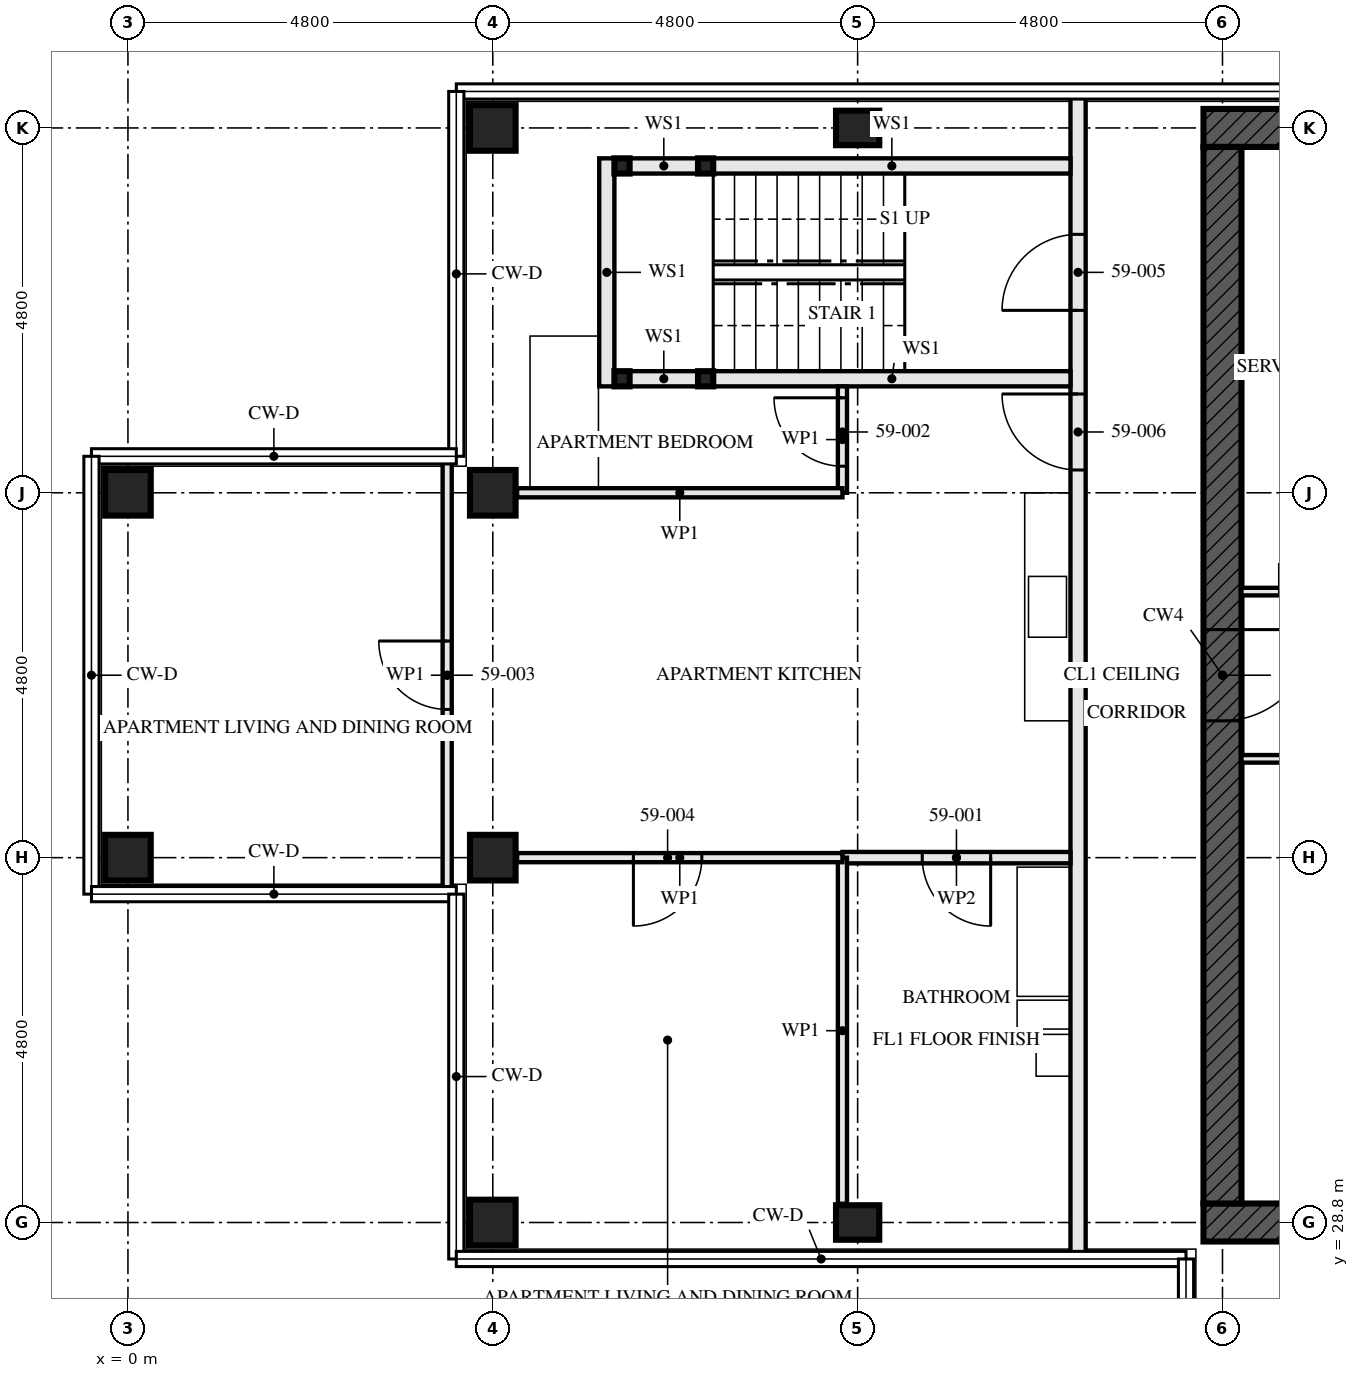
"""IFC4 building model, lengths in metres.
Left out: names, types, materials, properties, quantities, classifications, styles, units other than length and angle.
Written with IfcOpenShell. Run it as: python <this file> out.ifc"""

import sys

from ifc_helpers import new_model, si_unit, direction, frame, frame_2d, origin, origin_2d, place, context, subcontext, project, spatial, rectangle, hollow_rectangle, i_section, extrude, element, fill, save


model = new_model("IFC4")
c1 = context("Model", 3, precision=1e-05, world=origin(), true_north=direction((0.0, 1.0)))
c2 = subcontext(c1, "Body", "Model", "MODEL_VIEW")
j1 = project(units=[si_unit("LENGTHUNIT", "METRE"), si_unit("PLANEANGLEUNIT", "RADIAN")], contexts=[c1])
p1 = place(None, origin())
s1 = spatial("IfcSite", under=j1, at=p1, CompositionType="ELEMENT")
p2 = place(p1, origin())
s2 = spatial("IfcBuilding", under=s1, at=p2, CompositionType="ELEMENT")
p3 = place(p2, frame((0.0, 0.0, 215.5)))
s3 = spatial("IfcBuildingStorey", under=s2, at=p3, CompositionType="ELEMENT", Elevation=215.5)
for number, where, z_axis, x_axis in (
    (1, (0.0, 33.6, 0.0), (0.0, 0.0, 1.0), (0.0, 1.0, 0.0)),
    (2, (0.0, 38.4, 0.0), (0.0, 0.0, 1.0), (0.0, 1.0, 0.0)),
    (3, (4.8, 28.8, 0.0), (0.0, 0.0, 1.0), (0.0, 1.0, 0.0)),
    (4, (4.8, 33.6, 0.0), (0.0, 0.0, 1.0), (0.0, 1.0, 0.0)),
    (5, (4.8, 38.4, 0.0), (0.0, 0.0, 1.0), (0.0, 1.0, 0.0)),
    (6, (4.8, 43.2, 0.0), (0.0, 0.0, 1.0), (0.0, 1.0, 0.0)),
):
    element("IfcColumn", number, at=place(p3, frame(where, z_axis=z_axis, x_axis=x_axis)), inside=s3, PredefinedType="COLUMN", context=c2, shape_type="SweptSolid", body=[
        extrude(hollow_rectangle(XDim=0.6, YDim=0.6, WallThickness=0.05, at=origin_2d()), origin(), (0.0, 0.0, 1.0), 3.5),
    ])
for number, where, z_axis, x_axis in (
    (7, (9.6, 28.8, 0.0), (0.0, 0.0, 1.0), (0.0, 1.0, 0.0)),
    (8, (9.6, 43.2, 0.0), (0.0, 0.0, 1.0), (0.0, 1.0, 0.0)),
):
    element("IfcColumn", number, at=place(p3, frame(where, z_axis=z_axis, x_axis=x_axis)), inside=s3, PredefinedType="COLUMN", context=c2, shape_type="SweptSolid", body=[
        extrude(i_section(OverallWidth=0.454, OverallDepth=0.569, WebThickness=0.078, FlangeThickness=0.125, FilletRadius=0.015, at=origin_2d()), origin(), (0.0, 0.0, 1.0), 3.5),
    ])
p4 = place(p3, frame((14.15, 28.8, -0.17), z_axis=(0.0, 0.0, 1.0), x_axis=(1.0, 0.0, 0.0)))
e9 = element("IfcWall", 9, at=p4, inside=s3, PredefinedType="SHEAR", context=c2, shape_type="SweptSolid", body=[
    extrude(rectangle(XDim=14.9, YDim=0.5, at=frame_2d((7.45, 0.0))), origin(), (0.0, 0.0, 1.0), 3.5),
])
p5 = place(p4, frame((6.85, 0.0, 0.17)))
e10 = element("IfcOpeningElement", 10, at=p5, cuts=e9, PredefinedType="OPENING", context=c2, shape_type="SweptSolid", body=[
    extrude(rectangle(XDim=1.2, YDim=2.1, at=frame_2d((0.6, 1.05))), frame((0.0, 0.26, 0.0), z_axis=(0.0, -1.0, 0.0), x_axis=(1.0, 0.0, 0.0)), (0.0, 0.0, 1.0), 0.521),
])
p6 = place(p3, frame((29.05, 43.2, -0.17), z_axis=(0.0, 0.0, 1.0), x_axis=(-1.0, 0.0, 0.0)))
e11 = element("IfcWall", 11, at=p6, inside=s3, PredefinedType="SHEAR", context=c2, shape_type="SweptSolid", body=[
    extrude(rectangle(XDim=14.9, YDim=0.5, at=frame_2d((7.45, 0.0))), origin(), (0.0, 0.0, 1.0), 3.5),
])
p7 = place(p3, frame((14.4, 42.95, -0.17), z_axis=(0.0, 0.0, 1.0), x_axis=(0.0, -1.0, 0.0)))
e12 = element("IfcWall", 12, at=p7, inside=s3, PredefinedType="SHEAR", context=c2, shape_type="SweptSolid", body=[
    extrude(rectangle(XDim=13.9, YDim=0.5, at=frame_2d((6.95, 0.0))), origin(), (0.0, 0.0, 1.0), 3.5),
])
p8 = place(p7, frame((6.35, 0.0, 0.17)))
e13 = element("IfcOpeningElement", 13, at=p8, cuts=e12, PredefinedType="OPENING", context=c2, shape_type="SweptSolid", body=[
    extrude(rectangle(XDim=1.2, YDim=2.1, at=frame_2d((0.6, 1.05))), frame((0.0, 0.26, 0.0), z_axis=(0.0, -1.0, 0.0), x_axis=(1.0, 0.0, 0.0)), (0.0, 0.0, 1.0), 0.521),
])
for number, where, z_axis, x_axis in (
    (14, (6.5, 42.7, 0.0), (0.0, 0.0, 1.0), (1.0, 0.0, 0.0)),
    (15, (6.5, 39.9, 0.0), (0.0, 0.0, 1.0), (1.0, 0.0, 0.0)),
    (16, (7.6, 42.7, 0.0), (0.0, 0.0, 1.0), (1.0, 0.0, 0.0)),
    (17, (7.6, 39.9, 0.0), (0.0, 0.0, 1.0), (1.0, 0.0, 0.0)),
):
    element("IfcColumn", number, at=place(p3, frame(where, z_axis=z_axis, x_axis=x_axis)), inside=s3, PredefinedType="COLUMN", context=c2, shape_type="SweptSolid", body=[
        extrude(hollow_rectangle(XDim=0.2, YDim=0.2, WallThickness=0.008, at=origin_2d()), origin(), (0.0, 0.0, 1.0), 3.33),
    ])
p9 = place(p3, frame((6.6, 42.7, 0.0), z_axis=(0.0, 0.0, 1.0), x_axis=(1.0, 0.0, 0.0)))
e18 = element("IfcWall", 18, at=p9, inside=s3, PredefinedType="SOLIDWALL", context=c2, shape_type="SweptSolid", body=[
    extrude(rectangle(XDim=0.9, YDim=0.2, at=frame_2d((0.45, 0.0))), origin(), (0.0, 0.0, 1.0), 2.99),
])
p10 = place(p3, frame((7.7, 42.7, 0.0), z_axis=(0.0, 0.0, 1.0), x_axis=(1.0, 0.0, 0.0)))
e19 = element("IfcWall", 19, at=p10, inside=s3, PredefinedType="SOLIDWALL", context=c2, shape_type="SweptSolid", body=[
    extrude(rectangle(XDim=4.7, YDim=0.2, at=frame_2d((2.35, 0.0))), origin(), (0.0, 0.0, 1.0), 2.99),
])
p11 = place(p3, frame((6.6, 39.9, 0.0), z_axis=(0.0, 0.0, 1.0), x_axis=(1.0, 0.0, 0.0)))
e20 = element("IfcWall", 20, at=p11, inside=s3, PredefinedType="SOLIDWALL", context=c2, shape_type="SweptSolid", body=[
    extrude(rectangle(XDim=0.9, YDim=0.2, at=frame_2d((0.45, 0.0))), origin(), (0.0, 0.0, 1.0), 2.99),
])
p12 = place(p3, frame((7.7, 39.9, 0.0), z_axis=(0.0, 0.0, 1.0), x_axis=(1.0, 0.0, 0.0)))
e21 = element("IfcWall", 21, at=p12, inside=s3, PredefinedType="SOLIDWALL", context=c2, shape_type="SweptSolid", body=[
    extrude(rectangle(XDim=4.7, YDim=0.2, at=frame_2d((2.35, 0.0))), origin(), (0.0, 0.0, 1.0), 2.99),
])
p13 = place(p3, frame((6.3, 42.8, 0.0), z_axis=(0.0, 0.0, 1.0), x_axis=(0.0, -1.0, 0.0)))
e22 = element("IfcWall", 22, at=p13, inside=s3, PredefinedType="SOLIDWALL", context=c2, shape_type="SweptSolid", body=[
    extrude(rectangle(XDim=3.0, YDim=0.2, at=frame_2d((1.5, 0.0))), origin(), (0.0, 0.0, 1.0), 3.33),
])
p14 = place(p3, frame((9.4, 33.6, 0.0), z_axis=(0.0, 0.0, 1.0), x_axis=(1.0, 0.0, 0.0)))
e23 = element("IfcWall", 23, at=p14, inside=s3, PredefinedType="PARTITIONING", context=c2, shape_type="SweptSolid", body=[
    extrude(rectangle(XDim=3.0, YDim=0.15, at=frame_2d((1.5, 0.0))), origin(), (0.0, 0.0, 1.0), 2.55),
])
p15 = place(p14, frame((1.05, 0.0, 0.0)))
e24 = element("IfcOpeningElement", 24, at=p15, cuts=e23, PredefinedType="OPENING", context=c2, shape_type="SweptSolid", body=[
    extrude(rectangle(XDim=0.9, YDim=2.1, at=frame_2d((0.45, 1.05))), frame((0.0, 0.085, 0.0), z_axis=(0.0, -1.0, 0.0), x_axis=(1.0, 0.0, 0.0)), (0.0, 0.0, 1.0), 0.171),
])
p16 = place(p3, frame((9.4, 39.8, 0.0), z_axis=(0.0, 0.0, 1.0), x_axis=(0.0, -1.0, 0.0)))
e25 = element("IfcWall", 25, at=p16, inside=s3, PredefinedType="PARTITIONING", context=c2, shape_type="SweptSolid", body=[
    extrude(rectangle(XDim=1.4, YDim=0.12, at=frame_2d((0.7, 0.0))), origin(), (0.0, 0.0, 1.0), 3.33),
])
p17 = place(p16, frame((0.15, 0.0, 0.0)))
e26 = element("IfcOpeningElement", 26, at=p17, cuts=e25, PredefinedType="OPENING", context=c2, shape_type="SweptSolid", body=[
    extrude(rectangle(XDim=0.9, YDim=2.1, at=frame_2d((0.45, 1.05))), frame((0.0, 0.071, 0.0), z_axis=(0.0, -1.0, 0.0), x_axis=(1.0, 0.0, 0.0)), (0.0, 0.0, 1.0), 0.141),
])
p18 = place(p3, frame((4.2, 38.855, 0.0), z_axis=(0.0, 0.0, 1.0), x_axis=(0.0, -1.0, 0.0)))
e27 = element("IfcWall", 27, at=p18, inside=s3, PredefinedType="PARTITIONING", context=c2, shape_type="SweptSolid", body=[
    extrude(rectangle(XDim=5.71, YDim=0.12, at=frame_2d((2.855, 0.0))), origin(), (0.0, 0.0, 1.0), 2.32),
])
p19 = place(p18, frame((2.405, 0.0, 0.0)))
e28 = element("IfcOpeningElement", 28, at=p19, cuts=e27, PredefinedType="OPENING", context=c2, shape_type="SweptSolid", body=[
    extrude(rectangle(XDim=0.9, YDim=2.1, at=frame_2d((0.45, 1.05))), frame((0.0, 0.071, 0.0), z_axis=(0.0, -1.0, 0.0), x_axis=(1.0, 0.0, 0.0)), (0.0, 0.0, 1.0), 0.141),
])
p20 = place(p3, frame((9.4, 33.6, 0.0), z_axis=(0.0, 0.0, 1.0), x_axis=(0.0, -1.0, 0.0)))
e29 = element("IfcWall", 29, at=p20, inside=s3, PredefinedType="PARTITIONING", context=c2, shape_type="SweptSolid", body=[
    extrude(rectangle(XDim=4.553, YDim=0.12, at=frame_2d((2.276, 0.0))), origin(), (0.0, 0.0, 1.0), 3.33),
])
p21 = place(p3, frame((5.12, 38.4, 0.0), z_axis=(0.0, 0.0, 1.0), x_axis=(1.0, 0.0, 0.0)))
e30 = element("IfcWall", 30, at=p21, inside=s3, PredefinedType="PARTITIONING", context=c2, shape_type="SweptSolid", body=[
    extrude(rectangle(XDim=4.28, YDim=0.12, at=frame_2d((2.14, 0.0))), origin(), (0.0, 0.0, 1.0), 2.55),
])
p22 = place(p3, frame((5.12, 33.6, 0.0), z_axis=(0.0, 0.0, 1.0), x_axis=(1.0, 0.0, 0.0)))
e31 = element("IfcWall", 31, at=p22, inside=s3, PredefinedType="PARTITIONING", context=c2, shape_type="SweptSolid", body=[
    extrude(rectangle(XDim=4.28, YDim=0.12, at=frame_2d((2.14, 0.0))), origin(), (0.0, 0.0, 1.0), 2.55),
])
p23 = place(p22, frame((1.53, 0.0, 0.0)))
e32 = element("IfcOpeningElement", 32, at=p23, cuts=e31, PredefinedType="OPENING", context=c2, shape_type="SweptSolid", body=[
    extrude(rectangle(XDim=0.9, YDim=2.1, at=frame_2d((0.45, 1.05))), frame((0.0, 0.071, 0.0), z_axis=(0.0, -1.0, 0.0), x_axis=(1.0, 0.0, 0.0)), (0.0, 0.0, 1.0), 0.141),
])
p24 = place(p3, frame((12.5, 43.655, 0.0), z_axis=(0.0, 0.0, 1.0), x_axis=(0.0, -1.0, 0.0)))
e33 = element("IfcWall", 33, at=p24, inside=s3, PredefinedType="PARTITIONING", context=c2, shape_type="SweptSolid", body=[
    extrude(rectangle(XDim=15.31, YDim=0.2, at=frame_2d((7.655, 0.0))), origin(), (0.0, 0.0, 1.0), 2.32),
])
p25 = place(p24, frame((1.855, 0.0, 0.0)))
e34 = element("IfcOpeningElement", 34, at=p25, cuts=e33, PredefinedType="OPENING", context=c2, shape_type="SweptSolid", body=[
    extrude(rectangle(XDim=1.0, YDim=2.1, at=frame_2d((0.5, 1.05))), frame((0.0, 0.111, 0.0), z_axis=(0.0, -1.0, 0.0), x_axis=(1.0, 0.0, 0.0)), (0.0, 0.0, 1.0), 0.221),
])
p26 = place(p24, frame((3.955, 0.0, 0.0)))
e35 = element("IfcOpeningElement", 35, at=p26, cuts=e33, PredefinedType="OPENING", context=c2, shape_type="SweptSolid", body=[
    extrude(rectangle(XDim=1.0, YDim=2.1, at=frame_2d((0.5, 1.05))), frame((0.0, 0.111, 0.0), z_axis=(0.0, -1.0, 0.0), x_axis=(1.0, 0.0, 0.0)), (0.0, 0.0, 1.0), 0.221),
])
p27 = place(p3, frame((14.65, 34.9, 0.0), z_axis=(0.0, 0.0, 1.0), x_axis=(1.0, 0.0, 0.0)))
e36 = element("IfcWall", 36, at=p27, inside=s3, PredefinedType="SOLIDWALL", context=c2, shape_type="SweptSolid", body=[
    extrude(rectangle(XDim=5.9, YDim=0.1, at=frame_2d((2.95, 0.0))), origin(), (0.0, 0.0, 1.0), 3.33),
])
p28 = place(p27, frame((1.6, 0.0, 0.0)))
e37 = element("IfcOpeningElement", 37, at=p28, cuts=e36, PredefinedType="OPENING", context=c2, shape_type="SweptSolid", body=[
    extrude(rectangle(XDim=0.7, YDim=2.1, at=frame_2d((0.35, 1.05))), frame((0.0, 0.061, 0.0), z_axis=(0.0, -1.0, 0.0), x_axis=(1.0, 0.0, 0.0)), (0.0, 0.0, 1.0), 0.121),
])
p29 = place(p3, frame((14.65, 37.1, 0.0), z_axis=(0.0, 0.0, 1.0), x_axis=(1.0, 0.0, 0.0)))
e38 = element("IfcWall", 38, at=p29, inside=s3, PredefinedType="SOLIDWALL", context=c2, shape_type="SweptSolid", body=[
    extrude(rectangle(XDim=5.9, YDim=0.1, at=frame_2d((2.95, 0.0))), origin(), (0.0, 0.0, 1.0), 3.33),
])
p30 = place(p29, frame((0.5, 0.0, 0.0)))
e39 = element("IfcOpeningElement", 39, at=p30, cuts=e38, PredefinedType="OPENING", context=c2, shape_type="SweptSolid", body=[
    extrude(rectangle(XDim=0.7, YDim=2.1, at=frame_2d((0.35, 1.05))), frame((0.0, 0.061, 0.0), z_axis=(0.0, -1.0, 0.0), x_axis=(1.0, 0.0, 0.0)), (0.0, 0.0, 1.0), 0.121),
])
p31 = place(p29, frame((1.9, 0.0, 0.0)))
e40 = element("IfcOpeningElement", 40, at=p31, cuts=e38, PredefinedType="OPENING", context=c2, shape_type="SweptSolid", body=[
    extrude(rectangle(XDim=0.9, YDim=2.1, at=frame_2d((0.45, 1.05))), frame((0.0, 0.061, 0.0), z_axis=(0.0, -1.0, 0.0), x_axis=(1.0, 0.0, 0.0)), (0.0, 0.0, 1.0), 0.121),
])
p32 = place(p15, frame((0.9, 0.0, 0.0), z_axis=(0.0, 0.0, 1.0), x_axis=(-1.0, 0.0, 0.0)))
e41 = element("IfcDoor", 41, at=p32, inside=s3, OperationType="SINGLE_SWING_RIGHT", PredefinedType="DOOR", context=c2, shape_type="SweptSolid", body=[
    extrude(rectangle(XDim=0.9, YDim=2.1, at=frame_2d((0.45, 1.05))), frame((0.0, 0.022, 0.0), z_axis=(0.0, -1.0, 0.0), x_axis=(1.0, 0.0, 0.0)), (0.0, 0.0, 1.0), 0.044),
])
fill(e24, e41)
p33 = place(p17, frame((0.9, 0.0, 0.0), z_axis=(0.0, 0.0, 1.0), x_axis=(-1.0, 0.0, 0.0)))
e42 = element("IfcDoor", 42, at=p33, inside=s3, OperationType="SINGLE_SWING_LEFT", PredefinedType="DOOR", context=c2, shape_type="SweptSolid", body=[
    extrude(rectangle(XDim=0.9, YDim=2.1, at=frame_2d((0.45, 1.05))), frame((0.0, 0.022, 0.0), z_axis=(0.0, -1.0, 0.0), x_axis=(1.0, 0.0, 0.0)), (0.0, 0.0, 1.0), 0.044),
])
fill(e26, e42)
p34 = place(p19, frame((0.9, 0.0, 0.0), z_axis=(0.0, 0.0, 1.0), x_axis=(-1.0, 0.0, 0.0)))
e43 = element("IfcDoor", 43, at=p34, inside=s3, OperationType="SINGLE_SWING_LEFT", PredefinedType="DOOR", context=c2, shape_type="SweptSolid", body=[
    extrude(rectangle(XDim=0.9, YDim=2.1, at=frame_2d((0.45, 1.05))), frame((0.0, 0.022, 0.0), z_axis=(0.0, -1.0, 0.0), x_axis=(1.0, 0.0, 0.0)), (0.0, 0.0, 1.0), 0.044),
])
fill(e28, e43)
p35 = place(p23, frame((0.9, 0.0, 0.0), z_axis=(0.0, 0.0, 1.0), x_axis=(-1.0, 0.0, 0.0)))
e44 = element("IfcDoor", 44, at=p35, inside=s3, OperationType="SINGLE_SWING_LEFT", PredefinedType="DOOR", context=c2, shape_type="SweptSolid", body=[
    extrude(rectangle(XDim=0.9, YDim=2.1, at=frame_2d((0.45, 1.05))), frame((0.0, 0.022, 0.0), z_axis=(0.0, -1.0, 0.0), x_axis=(1.0, 0.0, 0.0)), (0.0, 0.0, 1.0), 0.044),
])
fill(e32, e44)
p36 = place(p25, frame((1.0, 0.0, 0.0), z_axis=(0.0, 0.0, 1.0), x_axis=(-1.0, 0.0, 0.0)))
e45 = element("IfcDoor", 45, at=p36, inside=s3, OperationType="SINGLE_SWING_RIGHT", PredefinedType="DOOR", context=c2, shape_type="SweptSolid", body=[
    extrude(rectangle(XDim=1.0, YDim=2.1, at=frame_2d((0.5, 1.05))), frame((0.0, 0.032, 0.0), z_axis=(0.0, -1.0, 0.0), x_axis=(1.0, 0.0, 0.0)), (0.0, 0.0, 1.0), 0.064),
])
fill(e34, e45)
p37 = place(p26, frame((1.0, 0.0, 0.0), z_axis=(0.0, 0.0, 1.0), x_axis=(-1.0, 0.0, 0.0)))
e46 = element("IfcDoor", 46, at=p37, inside=s3, OperationType="SINGLE_SWING_LEFT", PredefinedType="DOOR", context=c2, shape_type="SweptSolid", body=[
    extrude(rectangle(XDim=1.0, YDim=2.1, at=frame_2d((0.5, 1.05))), frame((0.0, 0.027, 0.0), z_axis=(0.0, -1.0, 0.0), x_axis=(1.0, 0.0, 0.0)), (0.0, 0.0, 1.0), 0.054),
])
fill(e35, e46)
p38 = place(p8, origin())
e47 = element("IfcDoor", 47, at=p38, inside=s3, OperationType="SINGLE_SWING_LEFT", PredefinedType="DOOR", context=c2, shape_type="SweptSolid", body=[
    extrude(rectangle(XDim=1.2, YDim=2.1, at=frame_2d((0.6, 1.05))), frame((0.0, 0.027, 0.0), z_axis=(0.0, -1.0, 0.0), x_axis=(1.0, 0.0, 0.0)), (0.0, 0.0, 1.0), 0.054),
])
fill(e13, e47)
save(model, sys.argv[1])
